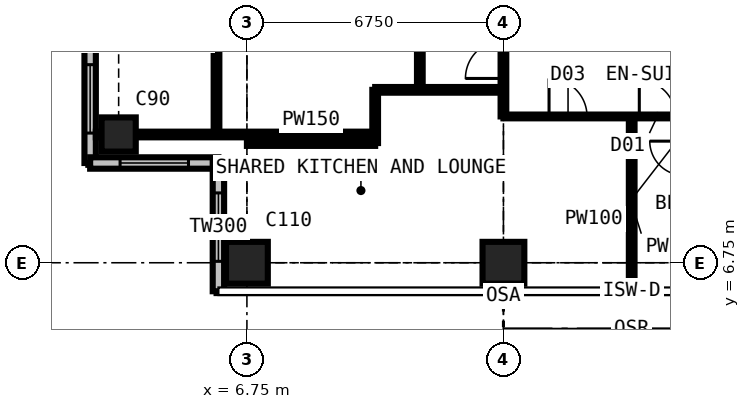
"""IFC4 building model, lengths in metres.
Left out: names, types, materials, properties, quantities, classifications, styles, units other than length and angle.
Written with IfcOpenShell. Run it as: python <this file> out.ifc"""

import sys

from ifc_helpers import new_model, si_unit, direction, frame, frame_2d, origin, origin_2d, place, context, subcontext, project, spatial, rectangle, extrude, element, fill, save


model = new_model("IFC4")
c1 = context("Model", 3, precision=1e-05, world=origin(), true_north=direction((0.0, 1.0)))
c2 = subcontext(c1, "Body", "Model", "MODEL_VIEW")
j1 = project(units=[si_unit("LENGTHUNIT", "METRE"), si_unit("PLANEANGLEUNIT", "RADIAN")], contexts=[c1])
p1 = place(None, origin())
s1 = spatial("IfcSite", under=j1, at=p1, CompositionType="ELEMENT")
p2 = place(p1, origin())
s2 = spatial("IfcBuilding", under=s1, at=p2, CompositionType="ELEMENT")
p3 = place(p2, frame((0.0, 0.0, 215.1)))
s3 = spatial("IfcBuildingStorey", under=s2, at=p3, CompositionType="ELEMENT", Elevation=215.1)
p4 = place(p3, frame((3.375, 10.125, 0.0), z_axis=(0.0, 0.0, 1.0), x_axis=(1.0, 0.0, 0.0)))
e1 = element("IfcColumn", 1, at=p4, inside=s3, PredefinedType="COLUMN", context=c2, shape_type="SweptSolid", body=[
    extrude(rectangle(XDim=0.9, YDim=0.9, at=origin_2d()), origin(), (0.0, 0.0, 1.0), 3.6),
])
for number, where, z_axis, x_axis in (
    (2, (6.75, 6.75, 0.0), (0.0, 0.0, 1.0), (1.0, 0.0, 0.0)),
    (3, (13.5, 6.75, 0.0), (0.0, 0.0, 1.0), (1.0, 0.0, 0.0)),
):
    element("IfcColumn", number, at=place(p3, frame(where, z_axis=z_axis, x_axis=x_axis)), inside=s3, PredefinedType="COLUMN", context=c2, shape_type="SweptSolid", body=[
        extrude(rectangle(XDim=1.1, YDim=1.1, at=origin_2d()), origin(), (0.0, 0.0, 1.0), 3.6),
    ])
p5 = place(p3, frame((2.625, 12.75, 0.0), z_axis=(0.0, 0.0, 1.0), x_axis=(0.0, -1.0, 0.0)))
e4 = element("IfcWall", 4, at=p5, inside=s3, PredefinedType="SOLIDWALL", context=c2, shape_type="SweptSolid", body=[
    extrude(rectangle(XDim=3.375, YDim=0.3, at=frame_2d((1.688, 0.0))), origin(), (0.0, 0.0, 1.0), 3.375),
])
p6 = place(p5, frame((0.788, 0.0, 0.6)))
e5 = element("IfcOpeningElement", 5, at=p6, cuts=e4, PredefinedType="OPENING", context=c2, shape_type="SweptSolid", body=[
    extrude(rectangle(XDim=1.8, YDim=2.1, at=frame_2d((0.9, 1.05))), frame((0.0, 0.16, 0.0), z_axis=(0.0, -1.0, 0.0), x_axis=(1.0, 0.0, 0.0)), (0.0, 0.0, 1.0), 0.32),
])
p7 = place(p3, frame((2.625, 9.375, 0.0), z_axis=(0.0, 0.0, 1.0), x_axis=(1.0, 0.0, 0.0)))
e6 = element("IfcWall", 6, at=p7, inside=s3, PredefinedType="SOLIDWALL", context=c2, shape_type="SweptSolid", body=[
    extrude(rectangle(XDim=3.375, YDim=0.3, at=frame_2d((1.688, 0.0))), origin(), (0.0, 0.0, 1.0), 3.375),
])
p8 = place(p7, frame((0.788, 0.0, 0.6)))
e7 = element("IfcOpeningElement", 7, at=p8, cuts=e6, PredefinedType="OPENING", context=c2, shape_type="SweptSolid", body=[
    extrude(rectangle(XDim=1.8, YDim=2.1, at=frame_2d((0.9, 1.05))), frame((0.0, 0.16, 0.0), z_axis=(0.0, -1.0, 0.0), x_axis=(1.0, 0.0, 0.0)), (0.0, 0.0, 1.0), 0.32),
])
p9 = place(p3, frame((6.0, 9.375, 0.0), z_axis=(0.0, 0.0, 1.0), x_axis=(0.0, -1.0, 0.0)))
e8 = element("IfcWall", 8, at=p9, inside=s3, PredefinedType="SOLIDWALL", context=c2, shape_type="SweptSolid", body=[
    extrude(rectangle(XDim=3.375, YDim=0.3, at=frame_2d((1.688, 0.0))), origin(), (0.0, 0.0, 1.0), 3.375),
])
p10 = place(p9, frame((0.788, 0.0, 0.6)))
e9 = element("IfcOpeningElement", 9, at=p10, cuts=e8, PredefinedType="OPENING", context=c2, shape_type="SweptSolid", body=[
    extrude(rectangle(XDim=1.8, YDim=2.1, at=frame_2d((0.9, 1.05))), frame((0.0, 0.16, 0.0), z_axis=(0.0, -1.0, 0.0), x_axis=(1.0, 0.0, 0.0)), (0.0, 0.0, 1.0), 0.32),
])
p11 = place(p3, frame((2.775, 10.125, 0.0), z_axis=(0.0, 0.0, 1.0), x_axis=(1.0, 0.0, 0.0)))
e10 = element("IfcWall", 10, at=p11, inside=s3, PredefinedType="PARTITIONING", context=c2, shape_type="SweptSolid", body=[
    extrude(rectangle(XDim=7.35, YDim=0.15, at=frame_2d((3.675, 0.0))), origin(), (0.0, 0.0, 1.0), 2.877),
])
p12 = place(p3, frame((5.95, 10.125, 0.0), z_axis=(0.0, 0.0, 1.0), x_axis=(0.0, 1.0, 0.0)))
e11 = element("IfcWall", 11, at=p12, inside=s3, PredefinedType="PARTITIONING", context=c2, shape_type="SweptSolid", body=[
    extrude(rectangle(XDim=2.65, YDim=0.15, at=frame_2d((1.325, 0.0))), origin(), (0.0, 0.0, 1.0), 3.375),
])
p13 = place(p3, frame((6.75, 9.9, 0.0), z_axis=(0.0, 0.0, 1.0), x_axis=(1.0, 0.0, 0.0)))
e12 = element("IfcWall", 12, at=p13, inside=s3, PredefinedType="PARTITIONING", context=c2, shape_type="SweptSolid", body=[
    extrude(rectangle(XDim=3.375, YDim=0.15, at=frame_2d((1.688, 0.0))), origin(), (0.0, 0.0, 1.0), 3.375),
])
p14 = place(p3, frame((10.125, 9.9, 0.0), z_axis=(0.0, 0.0, 1.0), x_axis=(0.0, 1.0, 0.0)))
e13 = element("IfcWall", 13, at=p14, inside=s3, PredefinedType="PARTITIONING", context=c2, shape_type="SweptSolid", body=[
    extrude(rectangle(XDim=1.4, YDim=0.15, at=frame_2d((0.7, 0.0))), origin(), (0.0, 0.0, 1.0), 3.375),
])
p15 = place(p3, frame((10.125, 11.3, 0.0), z_axis=(0.0, 0.0, 1.0), x_axis=(1.0, 0.0, 0.0)))
e14 = element("IfcWall", 14, at=p15, inside=s3, PredefinedType="PARTITIONING", context=c2, shape_type="SweptSolid", body=[
    extrude(rectangle(XDim=3.375, YDim=0.15, at=frame_2d((1.688, 0.0))), origin(), (0.0, 0.0, 1.0), 3.375),
])
p16 = place(p3, frame((11.3, 11.3, 0.0), z_axis=(0.0, 0.0, 1.0), x_axis=(0.0, 1.0, 0.0)))
e15 = element("IfcWall", 15, at=p16, inside=s3, PredefinedType="PARTITIONING", context=c2, shape_type="SweptSolid", body=[
    extrude(rectangle(XDim=19.3, YDim=0.15, at=frame_2d((9.65, 0.0))), origin(), (0.0, 0.0, 1.0), 3.375),
])
p17 = place(p16, frame((18.1, 0.0, 0.0)))
e16 = element("IfcOpeningElement", 16, at=p17, cuts=e15, PredefinedType="OPENING", context=c2, shape_type="SweptSolid", body=[
    extrude(rectangle(XDim=1.0, YDim=2.2, at=frame_2d((0.5, 1.1))), frame((0.0, 0.085, 0.0), z_axis=(0.0, -1.0, 0.0), x_axis=(1.0, 0.0, 0.0)), (0.0, 0.0, 1.0), 0.17),
])
p18 = place(p16, frame((10.137, 0.0, 0.0)))
e17 = element("IfcOpeningElement", 17, at=p18, cuts=e15, PredefinedType="OPENING", context=c2, shape_type="SweptSolid", body=[
    extrude(rectangle(XDim=1.0, YDim=2.2, at=frame_2d((0.5, 1.1))), frame((0.0, 0.085, 0.0), z_axis=(0.0, -1.0, 0.0), x_axis=(1.0, 0.0, 0.0)), (0.0, 0.0, 1.0), 0.17),
])
p19 = place(p3, frame((13.5, 10.6, 0.0), z_axis=(0.0, 0.0, 1.0), x_axis=(0.0, 1.0, 0.0)))
e18 = element("IfcWall", 18, at=p19, inside=s3, PredefinedType="PARTITIONING", context=c2, shape_type="SweptSolid", body=[
    extrude(rectangle(XDim=2.3, YDim=0.15, at=frame_2d((1.15, 0.0))), origin(), (0.0, 0.0, 1.0), 2.877),
])
p20 = place(p19, frame((1.0, 0.0, 0.0)))
e19 = element("IfcOpeningElement", 19, at=p20, cuts=e18, PredefinedType="OPENING", context=c2, shape_type="SweptSolid", body=[
    extrude(rectangle(XDim=1.0, YDim=2.2, at=frame_2d((0.5, 1.1))), frame((0.0, 0.085, 0.0), z_axis=(0.0, -1.0, 0.0), x_axis=(1.0, 0.0, 0.0)), (0.0, 0.0, 1.0), 0.17),
])
p21 = place(p3, frame((13.5, 10.6, 0.0), z_axis=(0.0, 0.0, 1.0), x_axis=(1.0, 0.0, 0.0)))
e20 = element("IfcWall", 20, at=p21, inside=s3, PredefinedType="PARTITIONING", context=c2, shape_type="SweptSolid", body=[
    extrude(rectangle(XDim=10.125, YDim=0.1, at=frame_2d((5.062, 0.0))), origin(), (0.0, 0.0, 1.0), 3.375),
])
p22 = place(p21, frame((1.2, 0.0, 0.0)))
e21 = element("IfcOpeningElement", 21, at=p22, cuts=e20, PredefinedType="OPENING", context=c2, shape_type="SweptSolid", body=[
    extrude(rectangle(XDim=1.0, YDim=2.2, at=frame_2d((0.5, 1.1))), frame((0.0, 0.06, 0.0), z_axis=(0.0, -1.0, 0.0), x_axis=(1.0, 0.0, 0.0)), (0.0, 0.0, 1.0), 0.12),
])
p23 = place(p21, frame((3.575, 0.0, 0.0)))
e22 = element("IfcOpeningElement", 22, at=p23, cuts=e20, PredefinedType="OPENING", context=c2, shape_type="SweptSolid", body=[
    extrude(rectangle(XDim=0.95, YDim=2.2, at=frame_2d((0.475, 1.1))), frame((0.0, 0.06, 0.0), z_axis=(0.0, -1.0, 0.0), x_axis=(1.0, 0.0, 0.0)), (0.0, 0.0, 1.0), 0.12),
])
p24 = place(p21, frame((6.95, 0.0, 0.0)))
e23 = element("IfcOpeningElement", 23, at=p24, cuts=e20, PredefinedType="OPENING", context=c2, shape_type="SweptSolid", body=[
    extrude(rectangle(XDim=0.95, YDim=2.2, at=frame_2d((0.475, 1.1))), frame((0.0, 0.06, 0.0), z_axis=(0.0, -1.0, 0.0), x_axis=(1.0, 0.0, 0.0)), (0.0, 0.0, 1.0), 0.12),
])
p25 = place(p3, frame((16.875, 6.016, 0.0), z_axis=(0.0, 0.0, 1.0), x_axis=(0.0, 1.0, 0.0)))
e24 = element("IfcWall", 24, at=p25, inside=s3, PredefinedType="PARTITIONING", context=c2, shape_type="SweptSolid", body=[
    extrude(rectangle(XDim=4.584, YDim=0.15, at=frame_2d((2.292, 0.0))), origin(), (0.0, 0.0, 1.0), 3.375),
])
p26 = place(p6, origin())
e25 = element("IfcWindow", 25, at=p26, inside=s3, PartitioningType="SINGLE_PANEL", PredefinedType="WINDOW", context=c2, shape_type="SweptSolid", body=[
    extrude(rectangle(XDim=1.8, YDim=2.1, at=frame_2d((0.9, 1.05))), frame((0.0, 0.03, 0.0), z_axis=(0.0, -1.0, 0.0), x_axis=(1.0, 0.0, 0.0)), (0.0, 0.0, 1.0), 0.06),
])
fill(e5, e25)
p27 = place(p8, origin())
e26 = element("IfcWindow", 26, at=p27, inside=s3, PartitioningType="SINGLE_PANEL", PredefinedType="WINDOW", context=c2, shape_type="SweptSolid", body=[
    extrude(rectangle(XDim=1.8, YDim=2.1, at=frame_2d((0.9, 1.05))), frame((0.0, 0.03, 0.0), z_axis=(0.0, -1.0, 0.0), x_axis=(1.0, 0.0, 0.0)), (0.0, 0.0, 1.0), 0.06),
])
fill(e7, e26)
p28 = place(p10, origin())
e27 = element("IfcWindow", 27, at=p28, inside=s3, PartitioningType="SINGLE_PANEL", PredefinedType="WINDOW", context=c2, shape_type="SweptSolid", body=[
    extrude(rectangle(XDim=1.8, YDim=2.1, at=frame_2d((0.9, 1.05))), frame((0.0, 0.03, 0.0), z_axis=(0.0, -1.0, 0.0), x_axis=(1.0, 0.0, 0.0)), (0.0, 0.0, 1.0), 0.06),
])
fill(e9, e27)
p29 = place(p22, origin())
e28 = element("IfcDoor", 28, at=p29, inside=s3, OperationType="SINGLE_SWING_LEFT", PredefinedType="DOOR", context=c2, shape_type="SweptSolid", body=[
    extrude(rectangle(XDim=1.0, YDim=2.2, at=frame_2d((0.5, 1.1))), frame((0.0, 0.025, 0.0), z_axis=(0.0, -1.0, 0.0), x_axis=(1.0, 0.0, 0.0)), (0.0, 0.0, 1.0), 0.05),
])
fill(e21, e28)
p30 = place(p23, origin())
e29 = element("IfcDoor", 29, at=p30, inside=s3, OperationType="SINGLE_SWING_LEFT", PredefinedType="DOOR", context=c2, shape_type="SweptSolid", body=[
    extrude(rectangle(XDim=0.95, YDim=2.2, at=frame_2d((0.475, 1.1))), frame((0.0, 0.025, 0.0), z_axis=(0.0, -1.0, 0.0), x_axis=(1.0, 0.0, 0.0)), (0.0, 0.0, 1.0), 0.05),
])
fill(e22, e29)
p31 = place(p20, origin())
e30 = element("IfcDoor", 30, at=p31, inside=s3, OperationType="SINGLE_SWING_LEFT", PredefinedType="DOOR", context=c2, shape_type="SweptSolid", body=[
    extrude(rectangle(XDim=1.0, YDim=2.2, at=frame_2d((0.5, 1.1))), frame((0.0, 0.025, 0.0), z_axis=(0.0, -1.0, 0.0), x_axis=(1.0, 0.0, 0.0)), (0.0, 0.0, 1.0), 0.05),
])
fill(e19, e30)
save(model, sys.argv[1])
